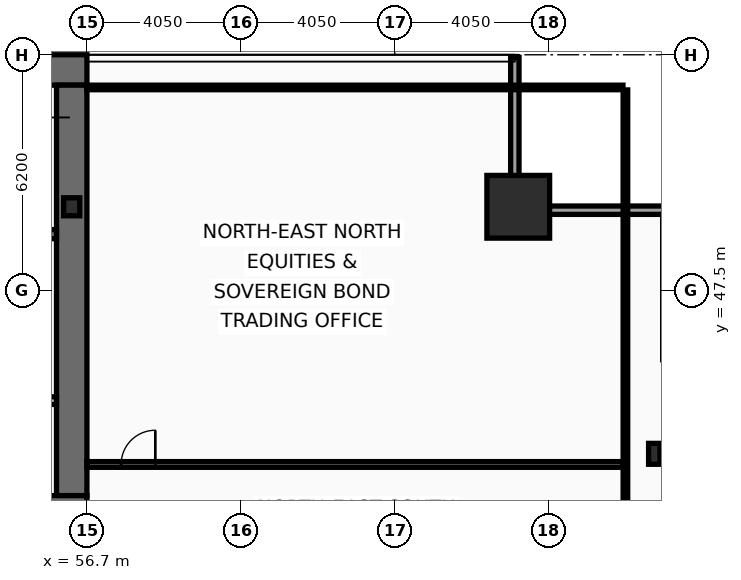
"""IFC4 building model, lengths in metres.
Left out: names, types, materials, properties, quantities, classifications, styles, units other than length and angle.
Written with IfcOpenShell. Run it as: python <this file> out.ifc"""

import sys

from ifc_helpers import new_model, si_unit, direction, frame, frame_2d, origin, origin_2d, place, context, subcontext, project, spatial, rectangle, hollow_rectangle, i_section, extrude, element, fill, save


model = new_model("IFC4")
c1 = context("Model", 3, precision=1e-05, world=origin(), true_north=direction((0.0, 1.0)))
c2 = subcontext(c1, "Body", "Model", "MODEL_VIEW")
j1 = project(units=[si_unit("LENGTHUNIT", "METRE"), si_unit("PLANEANGLEUNIT", "RADIAN")], contexts=[c1])
p1 = place(None, origin())
s1 = spatial("IfcSite", under=j1, at=p1, CompositionType="ELEMENT")
p2 = place(p1, origin())
s2 = spatial("IfcBuilding", under=s1, at=p2, CompositionType="ELEMENT")
p3 = place(p2, frame((0.0, 0.0, 29.8)))
s3 = spatial("IfcBuildingStorey", under=s2, at=p3, CompositionType="ELEMENT", Elevation=29.8)
p4 = place(p3, frame((16.2, 53.3, 0.0), z_axis=(0.0, 0.0, 1.0), x_axis=(1.0, 0.0, 0.0)))
e1 = element("IfcWall", 1, at=p4, inside=s3, PredefinedType="SHEAR", context=c2, shape_type="SweptSolid", body=[
    extrude(rectangle(XDim=40.5, YDim=0.8, at=frame_2d((20.25, 0.0))), origin(), (0.0, 0.0, 1.0), 3.82),
])
p5 = place(p3, frame((56.3, 52.9, 0.0), z_axis=(0.0, 0.0, 1.0), x_axis=(0.0, -1.0, 0.0)))
e2 = element("IfcWall", 2, at=p5, inside=s3, PredefinedType="SHEAR", context=c2, shape_type="SweptSolid", body=[
    extrude(rectangle(XDim=10.8, YDim=0.8, at=frame_2d((5.4, 0.0))), origin(), (0.0, 0.0, 1.0), 3.82),
])
p6 = place(p3, frame((56.7, 41.7, 0.0), z_axis=(0.0, 0.0, 1.0), x_axis=(-1.0, 0.0, 0.0)))
e3 = element("IfcWall", 3, at=p6, inside=s3, PredefinedType="SHEAR", context=c2, shape_type="SweptSolid", body=[
    extrude(rectangle(XDim=2.45, YDim=0.8, at=frame_2d((1.225, 0.0))), origin(), (0.0, 0.0, 1.0), 3.82),
])
p7 = place(p3, frame((48.63, 48.98, 0.0), z_axis=(0.0, 0.0, 1.0), x_axis=(1.0, 0.0, 0.0)))
e4 = element("IfcWall", 4, at=p7, inside=s3, PredefinedType="SHEAR", context=c2, shape_type="SweptSolid", body=[
    extrude(rectangle(XDim=7.27, YDim=0.24, at=frame_2d((3.635, 0.0))), origin(), (0.0, 0.0, 1.0), 3.82),
])
p8 = place(p7, frame((6.0, 0.0, 0.0)))
e5 = element("IfcOpeningElement", 5, at=p8, cuts=e4, PredefinedType="OPENING", context=c2, shape_type="SweptSolid", body=[
    extrude(rectangle(XDim=1.05, YDim=2.15, at=frame_2d((0.525, 1.075))), frame((0.0, 0.13, 0.0), z_axis=(0.0, -1.0, 0.0), x_axis=(1.0, 0.0, 0.0)), (0.0, 0.0, 1.0), 0.26),
])
p9 = place(p3, frame((68.05, 49.7, 0.0), z_axis=(0.0, 0.0, 1.0), x_axis=(1.0, 0.0, 0.0)))
e6 = element("IfcColumn", 6, at=p9, inside=s3, PredefinedType="COLUMN", context=c2, shape_type="SweptSolid", body=[
    extrude(hollow_rectangle(XDim=1.65, YDim=1.65, WallThickness=0.075, at=origin_2d()), origin(), (0.0, 0.0, 1.0), 4.0),
])
p10 = place(p3, frame((71.63, 43.2, 0.0), z_axis=(0.0, 0.0, 1.0), x_axis=(1.0, 0.0, 0.0)))
e7 = element("IfcColumn", 7, at=p10, inside=s3, PredefinedType="COLUMN", context=c2, shape_type="SweptSolid", body=[
    extrude(i_section(OverallWidth=0.3, OverallDepth=0.55, WebThickness=0.015, FlangeThickness=0.029, at=origin_2d()), origin(), (0.0, 0.0, 1.0), 4.0),
])
p11 = place(p3, frame((56.3, 49.7, 0.0), z_axis=(0.0, 0.0, 1.0), x_axis=(1.0, 0.0, 0.0)))
e8 = element("IfcColumn", 8, at=p11, inside=s3, PredefinedType="COLUMN", context=c2, shape_type="SweptSolid", body=[
    extrude(i_section(OverallWidth=0.424, OverallDepth=0.474, WebThickness=0.048, FlangeThickness=0.077, at=origin_2d()), origin(), (0.0, 0.0, 1.0), 4.0),
])
p12 = place(p3, frame((67.96, 53.63, 0.0), z_axis=(0.0, 0.0, 1.0), x_axis=(0.0, -1.0, 0.0)))
e9 = element("IfcWall", 9, at=p12, inside=s3, PredefinedType="SOLIDWALL", context=c2, shape_type="SweptSolid", body=[
    extrude(rectangle(XDim=3.91, YDim=0.22, at=frame_2d((1.955, 0.0))), origin(), (0.0, 0.0, 1.0), 3.16),
])
p13 = place(p3, frame((67.85, 49.61, 0.0), z_axis=(0.0, 0.0, 1.0), x_axis=(1.0, 0.0, 0.0)))
e10 = element("IfcWall", 10, at=p13, inside=s3, PredefinedType="SOLIDWALL", context=c2, shape_type="SweptSolid", body=[
    extrude(rectangle(XDim=4.22, YDim=0.22, at=frame_2d((2.11, 0.0))), origin(), (0.0, 0.0, 1.0), 3.16),
])
p14 = place(p3, frame((51.9, 44.6, 0.0), z_axis=(0.0, 0.0, 1.0), x_axis=(1.0, 0.0, 0.0)))
e11 = element("IfcWall", 11, at=p14, inside=s3, PredefinedType="PARTITIONING", context=c2, shape_type="SweptSolid", body=[
    extrude(rectangle(XDim=4.0, YDim=0.2, at=frame_2d((2.0, 0.0))), origin(), (0.0, 0.0, 1.0), 3.82),
])
p15 = place(p14, frame((1.15, 0.0, 0.0)))
e12 = element("IfcOpeningElement", 12, at=p15, cuts=e11, PredefinedType="OPENING", context=c2, shape_type="SweptSolid", body=[
    extrude(rectangle(XDim=1.05, YDim=2.15, at=frame_2d((0.525, 1.075))), frame((0.0, 0.11, 0.0), z_axis=(0.0, -1.0, 0.0), x_axis=(1.0, 0.0, 0.0)), (0.0, 0.0, 1.0), 0.22),
])
p16 = place(p3, frame((56.7, 42.92, 0.0), z_axis=(0.0, 0.0, 1.0), x_axis=(1.0, 0.0, 0.0)))
e13 = element("IfcWall", 13, at=p16, inside=s3, PredefinedType="PARTITIONING", context=c2, shape_type="SweptSolid", body=[
    extrude(rectangle(XDim=14.105, YDim=0.15, at=frame_2d((7.052, 0.0))), origin(), (0.0, 0.0, 1.0), 3.01),
])
p17 = place(p16, frame((0.9, 0.0, 0.0)))
e14 = element("IfcOpeningElement", 14, at=p17, cuts=e13, PredefinedType="OPENING", context=c2, shape_type="SweptSolid", body=[
    extrude(rectangle(XDim=0.9, YDim=2.05, at=frame_2d((0.45, 1.025))), frame((0.0, 0.085, 0.0), z_axis=(0.0, -1.0, 0.0), x_axis=(1.0, 0.0, 0.0)), (0.0, 0.0, 1.0), 0.17),
])
p18 = place(p3, frame((70.87, 10.665, 0.0), z_axis=(0.0, 0.0, 1.0), x_axis=(0.0, 1.0, 0.0)))
e15 = element("IfcWall", 15, at=p18, inside=s3, PredefinedType="PARTITIONING", context=c2, shape_type="SweptSolid", body=[
    extrude(rectangle(XDim=42.11, YDim=0.12, at=frame_2d((21.055, 0.0))), origin(), (0.0, 0.0, 1.0), 3.01),
])
p19 = place(p3, frame((56.7, 52.84, 0.0), z_axis=(0.0, 0.0, 1.0), x_axis=(1.0, 0.0, 0.0)))
e16 = element("IfcWall", 16, at=p19, inside=s3, PredefinedType="PARTITIONING", context=c2, shape_type="SweptSolid", body=[
    extrude(rectangle(XDim=14.105, YDim=0.12, at=frame_2d((7.052, 0.0))), origin(), (0.0, 0.0, 1.0), 3.82),
])
p20 = place(p17, origin())
e17 = element("IfcDoor", 17, at=p20, inside=s3, OperationType="SINGLE_SWING_RIGHT", PredefinedType="DOOR", context=c2, shape_type="SweptSolid", body=[
    extrude(rectangle(XDim=0.9, YDim=2.05, at=frame_2d((0.45, 1.025))), frame((0.0, 0.025, 0.0), z_axis=(0.0, -1.0, 0.0), x_axis=(1.0, 0.0, 0.0)), (0.0, 0.0, 1.0), 0.05),
])
fill(e14, e17)
save(model, sys.argv[1])
